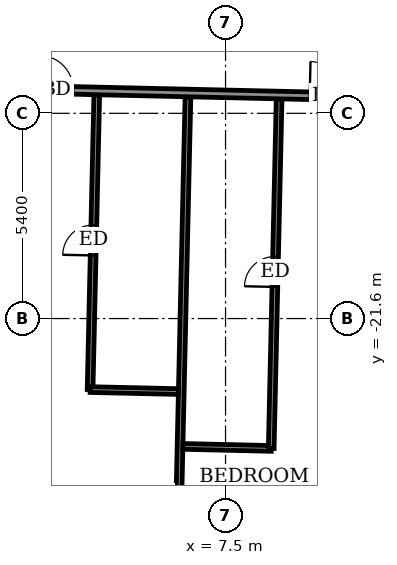
"""IFC4 building model, lengths in metres.
Left out: names, types, materials, properties, quantities, classifications, styles, units other than length and angle.
Written with IfcOpenShell. Run it as: python <this file> out.ifc"""

import sys

from ifc_helpers import new_model, si_unit, direction, frame, frame_2d, origin, place, context, subcontext, project, spatial, rectangle, extrude, element, fill, save


model = new_model("IFC4")
c1 = context("Model", 3, precision=1e-05, world=origin(), true_north=direction((0.0, 1.0)))
c2 = subcontext(c1, "Body", "Model", "MODEL_VIEW")
j1 = project(units=[si_unit("LENGTHUNIT", "METRE"), si_unit("PLANEANGLEUNIT", "RADIAN")], contexts=[c1])
p1 = place(None, origin())
s1 = spatial("IfcSite", under=j1, at=p1, CompositionType="ELEMENT")
p2 = place(p1, origin())
s2 = spatial("IfcBuilding", under=s1, at=p2, CompositionType="ELEMENT")
p3 = place(p2, frame((0.0, 0.0, 67.5)))
s3 = spatial("IfcBuildingStorey", under=s2, at=p3, CompositionType="ELEMENT", Elevation=67.5)
p4 = place(p3, frame((6.237, -27.862, 0.0), z_axis=(0.0, 0.0, 1.0), x_axis=(0.022637991173, 0.99974372784, 0.0)))
e1 = element("IfcWall", 1, at=p4, inside=s3, PredefinedType="PARTITIONING", context=c2, shape_type="SweptSolid", body=[
    extrude(rectangle(XDim=12.1, YDim=0.15, at=frame_2d((6.05, 0.0))), origin(), (0.0, 0.0, 1.0), 2.55),
])
p5 = place(p3, frame((6.379, -24.964, 0.0), z_axis=(0.0, 0.0, 1.0), x_axis=(0.99974053329, -0.022778632478, 0.0)))
e2 = element("IfcWall", 2, at=p5, inside=s3, PredefinedType="PARTITIONING", context=c2, shape_type="SweptSolid", body=[
    extrude(rectangle(XDim=2.326, YDim=0.15, at=frame_2d((1.163, 0.0))), origin(), (0.0, 0.0, 1.0), 3.05),
])
p6 = place(p3, frame((8.702, -25.017, 0.0), z_axis=(0.0, 0.0, 1.0), x_axis=(0.022611084784, 0.999744336741, 0.0)))
e3 = element("IfcWall", 3, at=p6, inside=s3, PredefinedType="PARTITIONING", context=c2, shape_type="SweptSolid", body=[
    extrude(rectangle(XDim=9.199, YDim=0.15, at=frame_2d((4.6, 0.0))), origin(), (0.0, 0.0, 1.0), 3.05),
])
p7 = place(p6, frame((4.25, 0.0, 0.0)))
e4 = element("IfcOpeningElement", 4, at=p7, cuts=e3, PredefinedType="OPENING", context=c2, shape_type="SweptSolid", body=[
    extrude(rectangle(XDim=0.8, YDim=2.1, at=frame_2d((0.4, 1.05))), frame((0.0, 0.085, 0.0), z_axis=(0.0, -1.0, 0.0), x_axis=(1.0, 0.0, 0.0)), (0.0, 0.0, 1.0), 0.17),
])
p8 = place(p3, frame((3.936, -23.469, 0.0), z_axis=(0.0, 0.0, 1.0), x_axis=(0.022683528451, 0.999742695666, 0.0)))
e5 = element("IfcWall", 5, at=p8, inside=s3, PredefinedType="PARTITIONING", context=c2, shape_type="SweptSolid", body=[
    extrude(rectangle(XDim=7.76, YDim=0.15, at=frame_2d((3.88, 0.0))), origin(), (0.0, 0.0, 1.0), 3.05),
])
p9 = place(p8, frame((3.53, 0.0, 0.0)))
e6 = element("IfcOpeningElement", 6, at=p9, cuts=e5, PredefinedType="OPENING", context=c2, shape_type="SweptSolid", body=[
    extrude(rectangle(XDim=0.8, YDim=2.1, at=frame_2d((0.4, 1.05))), frame((0.0, 0.085, 0.0), z_axis=(0.0, -1.0, 0.0), x_axis=(1.0, 0.0, 0.0)), (0.0, 0.0, 1.0), 0.17),
])
p10 = place(p3, frame((3.938, -23.469, 0.0), z_axis=(0.0, 0.0, 1.0), x_axis=(0.999749744571, -0.022370700241, 0.0)))
e7 = element("IfcWall", 7, at=p10, inside=s3, PredefinedType="PARTITIONING", context=c2, shape_type="SweptSolid", body=[
    extrude(rectangle(XDim=2.324, YDim=0.15, at=frame_2d((1.162, 0.0))), origin(), (0.0, 0.0, 1.0), 3.05),
])
p11 = place(p3, frame((-26.151, -14.924, 0.0), z_axis=(0.0, 0.0, 1.0), x_axis=(0.999742750999, -0.022681089575, 0.0)))
e8 = element("IfcWall", 8, at=p11, inside=s3, PredefinedType="PARTITIONING", context=c2, shape_type="SweptSolid", body=[
    extrude(rectangle(XDim=54.886, YDim=0.2, at=frame_2d((27.443, 0.0))), origin(), (0.0, 0.0, 1.0), 3.05),
])
p12 = place(p11, frame((1.345, 0.0, 0.0)))
e9 = element("IfcOpeningElement", 9, at=p12, cuts=e8, PredefinedType="OPENING", context=c2, shape_type="SweptSolid", body=[
    extrude(rectangle(XDim=1.0, YDim=2.1, at=frame_2d((0.5, 1.05))), frame((0.0, 0.11, 0.0), z_axis=(0.0, -1.0, 0.0), x_axis=(1.0, 0.0, 0.0)), (0.0, 0.0, 1.0), 0.22),
])
p13 = place(p11, frame((8.35, 0.0, 0.0)))
e10 = element("IfcOpeningElement", 10, at=p13, cuts=e8, PredefinedType="OPENING", context=c2, shape_type="SweptSolid", body=[
    extrude(rectangle(XDim=0.9, YDim=2.1, at=frame_2d((0.45, 1.05))), frame((0.0, 0.11, 0.0), z_axis=(0.0, -1.0, 0.0), x_axis=(1.0, 0.0, 0.0)), (0.0, 0.0, 1.0), 0.22),
])
p14 = place(p11, frame((10.625, 0.0, 0.0)))
e11 = element("IfcOpeningElement", 11, at=p14, cuts=e8, PredefinedType="OPENING", context=c2, shape_type="SweptSolid", body=[
    extrude(rectangle(XDim=0.9, YDim=2.1, at=frame_2d((0.45, 1.05))), frame((0.0, 0.11, 0.0), z_axis=(0.0, -1.0, 0.0), x_axis=(1.0, 0.0, 0.0)), (0.0, 0.0, 1.0), 0.22),
])
p15 = place(p11, frame((17.675, 0.0, 0.0)))
e12 = element("IfcOpeningElement", 12, at=p15, cuts=e8, PredefinedType="OPENING", context=c2, shape_type="SweptSolid", body=[
    extrude(rectangle(XDim=0.9, YDim=2.1, at=frame_2d((0.45, 1.05))), frame((0.0, 0.11, 0.0), z_axis=(0.0, -1.0, 0.0), x_axis=(1.0, 0.0, 0.0)), (0.0, 0.0, 1.0), 0.22),
])
p16 = place(p11, frame((19.725, 0.0, 0.0)))
e13 = element("IfcOpeningElement", 13, at=p16, cuts=e8, PredefinedType="OPENING", context=c2, shape_type="SweptSolid", body=[
    extrude(rectangle(XDim=0.9, YDim=2.1, at=frame_2d((0.45, 1.05))), frame((0.0, 0.11, 0.0), z_axis=(0.0, -1.0, 0.0), x_axis=(1.0, 0.0, 0.0)), (0.0, 0.0, 1.0), 0.22),
])
p17 = place(p11, frame((26.575, 0.0, 0.0)))
e14 = element("IfcOpeningElement", 14, at=p17, cuts=e8, PredefinedType="OPENING", context=c2, shape_type="SweptSolid", body=[
    extrude(rectangle(XDim=0.9, YDim=2.1, at=frame_2d((0.45, 1.05))), frame((0.0, 0.11, 0.0), z_axis=(0.0, -1.0, 0.0), x_axis=(1.0, 0.0, 0.0)), (0.0, 0.0, 1.0), 0.22),
])
p18 = place(p11, frame((28.75, 0.0, 0.0)))
e15 = element("IfcOpeningElement", 15, at=p18, cuts=e8, PredefinedType="OPENING", context=c2, shape_type="SweptSolid", body=[
    extrude(rectangle(XDim=0.9, YDim=2.1, at=frame_2d((0.45, 1.05))), frame((0.0, 0.11, 0.0), z_axis=(0.0, -1.0, 0.0), x_axis=(1.0, 0.0, 0.0)), (0.0, 0.0, 1.0), 0.22),
])
p19 = place(p11, frame((35.875, 0.0, 0.0)))
e16 = element("IfcOpeningElement", 16, at=p19, cuts=e8, PredefinedType="OPENING", context=c2, shape_type="SweptSolid", body=[
    extrude(rectangle(XDim=0.9, YDim=2.1, at=frame_2d((0.45, 1.05))), frame((0.0, 0.11, 0.0), z_axis=(0.0, -1.0, 0.0), x_axis=(1.0, 0.0, 0.0)), (0.0, 0.0, 1.0), 0.22),
])
p20 = place(p11, frame((38.1, 0.0, 0.0)))
e17 = element("IfcOpeningElement", 17, at=p20, cuts=e8, PredefinedType="OPENING", context=c2, shape_type="SweptSolid", body=[
    extrude(rectangle(XDim=0.9, YDim=2.1, at=frame_2d((0.45, 1.05))), frame((0.0, 0.11, 0.0), z_axis=(0.0, -1.0, 0.0), x_axis=(1.0, 0.0, 0.0)), (0.0, 0.0, 1.0), 0.22),
])
p21 = place(p11, frame((45.125, 0.0, 0.0)))
e18 = element("IfcOpeningElement", 18, at=p21, cuts=e8, PredefinedType="OPENING", context=c2, shape_type="SweptSolid", body=[
    extrude(rectangle(XDim=0.9, YDim=2.1, at=frame_2d((0.45, 1.05))), frame((0.0, 0.11, 0.0), z_axis=(0.0, -1.0, 0.0), x_axis=(1.0, 0.0, 0.0)), (0.0, 0.0, 1.0), 0.22),
])
p22 = place(p11, frame((52.618, 0.0, 0.0)))
e19 = element("IfcOpeningElement", 19, at=p22, cuts=e8, PredefinedType="OPENING", context=c2, shape_type="SweptSolid", body=[
    extrude(rectangle(XDim=1.0, YDim=2.1, at=frame_2d((0.5, 1.05))), frame((0.0, 0.11, 0.0), z_axis=(0.0, -1.0, 0.0), x_axis=(1.0, 0.0, 0.0)), (0.0, 0.0, 1.0), 0.22),
])
p23 = place(p11, frame((47.575, 0.0, 0.0)))
e20 = element("IfcOpeningElement", 20, at=p23, cuts=e8, PredefinedType="OPENING", context=c2, shape_type="SweptSolid", body=[
    extrude(rectangle(XDim=0.9, YDim=2.1, at=frame_2d((0.45, 1.05))), frame((0.0, 0.11, 0.0), z_axis=(0.0, -1.0, 0.0), x_axis=(1.0, 0.0, 0.0)), (0.0, 0.0, 1.0), 0.22),
])
p24 = place(p18, origin())
e21 = element("IfcDoor", 21, at=p24, inside=s3, OperationType="SINGLE_SWING_RIGHT", PredefinedType="DOOR", context=c2, shape_type="SweptSolid", body=[
    extrude(rectangle(XDim=0.9, YDim=2.1, at=frame_2d((0.45, 1.05))), frame((0.0, 0.025, 0.0), z_axis=(0.0, -1.0, 0.0), x_axis=(1.0, 0.0, 0.0)), (0.0, 0.0, 1.0), 0.05),
])
fill(e15, e21)
p25 = place(p9, origin())
e22 = element("IfcDoor", 22, at=p25, inside=s3, OperationType="SINGLE_SWING_RIGHT", PredefinedType="DOOR", context=c2, shape_type="SweptSolid", body=[
    extrude(rectangle(XDim=0.8, YDim=2.1, at=frame_2d((0.4, 1.05))), frame((0.0, 0.025, 0.0), z_axis=(0.0, -1.0, 0.0), x_axis=(1.0, 0.0, 0.0)), (0.0, 0.0, 1.0), 0.05),
])
fill(e6, e22)
p26 = place(p19, origin())
e23 = element("IfcDoor", 23, at=p26, inside=s3, OperationType="SINGLE_SWING_LEFT", PredefinedType="DOOR", context=c2, shape_type="SweptSolid", body=[
    extrude(rectangle(XDim=0.9, YDim=2.1, at=frame_2d((0.45, 1.05))), frame((0.0, 0.025, 0.0), z_axis=(0.0, -1.0, 0.0), x_axis=(1.0, 0.0, 0.0)), (0.0, 0.0, 1.0), 0.05),
])
fill(e16, e23)
p27 = place(p7, origin())
e24 = element("IfcDoor", 24, at=p27, inside=s3, OperationType="SINGLE_SWING_LEFT", PredefinedType="DOOR", context=c2, shape_type="SweptSolid", body=[
    extrude(rectangle(XDim=0.8, YDim=2.1, at=frame_2d((0.4, 1.05))), frame((0.0, 0.025, 0.0), z_axis=(0.0, -1.0, 0.0), x_axis=(1.0, 0.0, 0.0)), (0.0, 0.0, 1.0), 0.05),
])
fill(e4, e24)
save(model, sys.argv[1])
